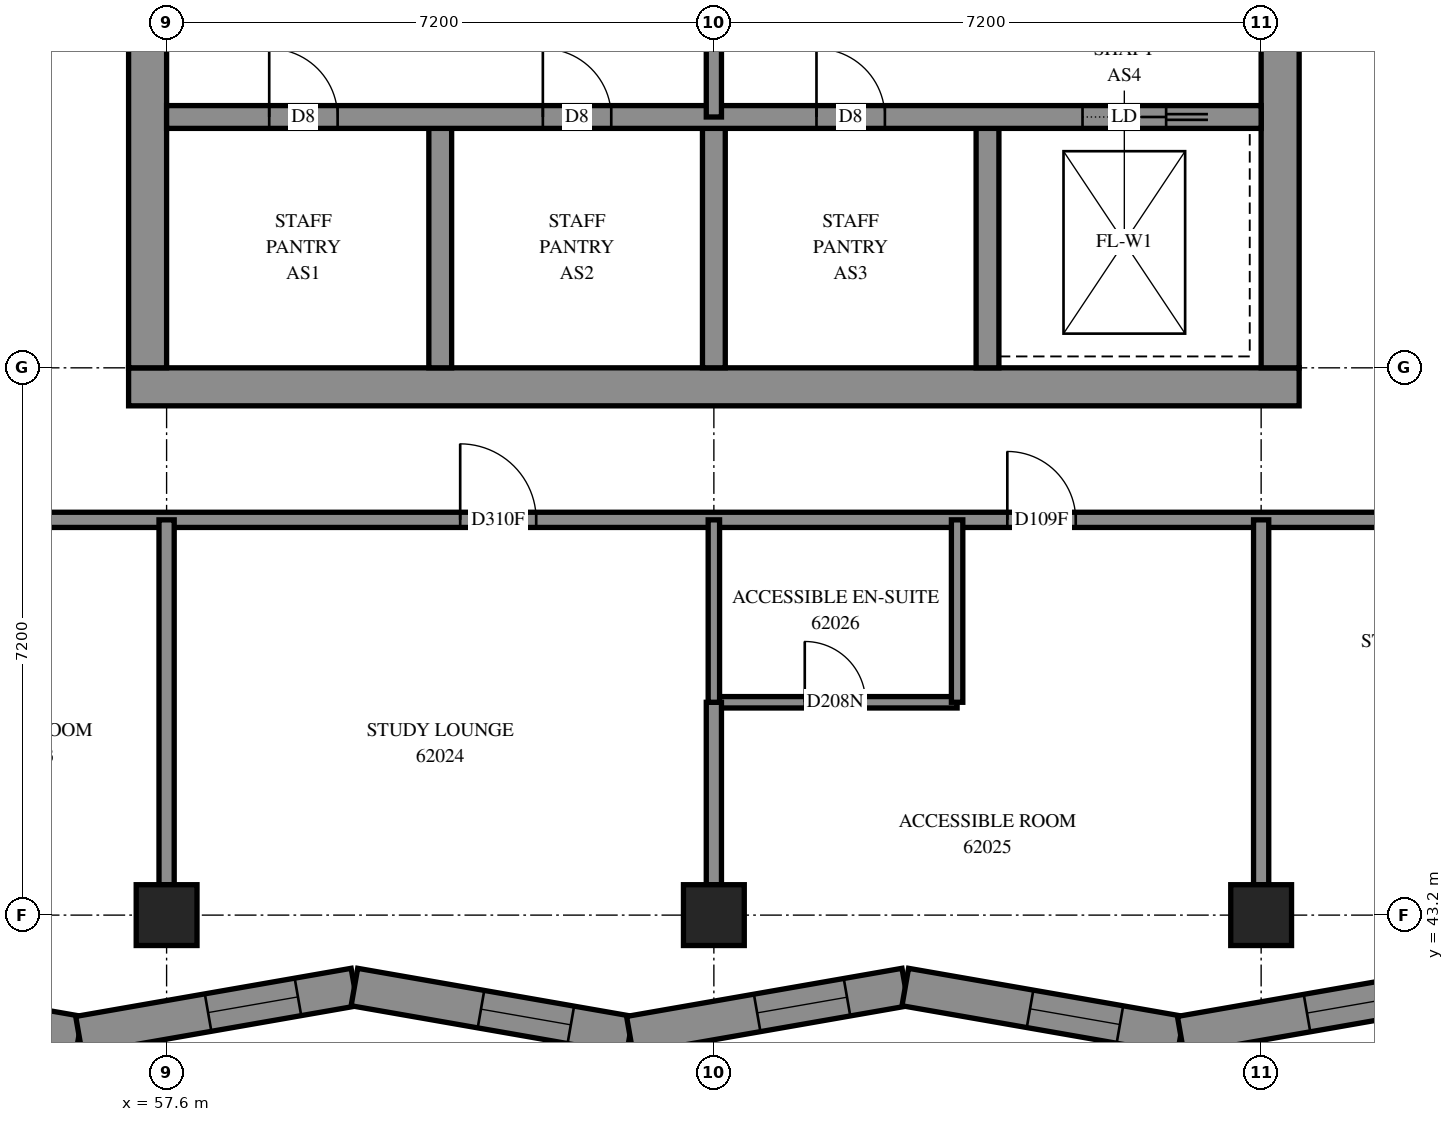
"""IFC4 building model, lengths in metres.
Left out: names, types, materials, properties, quantities, classifications, styles, units other than length and angle.
Written with IfcOpenShell. Run it as: python <this file> out.ifc"""

import sys

from ifc_helpers import new_model, si_unit, direction, frame, frame_2d, origin, origin_2d, place, context, subcontext, project, spatial, polyline, rectangle, outline, extrude, element, fill, save


model = new_model("IFC4")
c1 = context("Model", 3, precision=1e-05, world=origin(), true_north=direction((0.0, 1.0)))
c2 = subcontext(c1, "Body", "Model", "MODEL_VIEW")
j1 = project(units=[si_unit("LENGTHUNIT", "METRE"), si_unit("PLANEANGLEUNIT", "RADIAN")], contexts=[c1])
p1 = place(None, origin())
s1 = spatial("IfcSite", under=j1, at=p1, CompositionType="ELEMENT")
p2 = place(p1, origin())
s2 = spatial("IfcBuilding", under=s1, at=p2, CompositionType="ELEMENT")
p3 = place(p2, frame((0.0, 0.0, 227.0)))
s3 = spatial("IfcBuildingStorey", under=s2, at=p3, CompositionType="ELEMENT", Elevation=227.0)
for number, where, z_axis, x_axis in (
    (1, (57.6, 43.2, 0.0), (0.0, 0.0, 1.0), (1.0, 0.0, 0.0)),
    (2, (64.8, 43.2, 0.0), (0.0, 0.0, 1.0), (1.0, 0.0, 0.0)),
    (3, (72.0, 43.2, 0.0), (0.0, 0.0, 1.0), (1.0, 0.0, 0.0)),
):
    element("IfcColumn", number, at=place(p3, frame(where, z_axis=z_axis, x_axis=x_axis)), inside=s3, PredefinedType="COLUMN", context=c2, shape_type="SweptSolid", body=[
        extrude(rectangle(XDim=0.8, YDim=0.8, at=origin_2d()), origin(), (0.0, 0.0, 1.0), 3.1),
    ])
p4 = place(p3, frame((57.1, 50.15, -0.3), z_axis=(0.0, 0.0, 1.0), x_axis=(1.0, 0.0, 0.0)))
e4 = element("IfcWall", 4, at=p4, inside=s3, PredefinedType="SHEAR", context=c2, shape_type="SweptSolid", body=[
    extrude(rectangle(XDim=15.4, YDim=0.5, at=frame_2d((7.7, 0.0))), origin(), (0.0, 0.0, 1.0), 2.7),
])
p5 = place(p3, frame((57.35, 50.4, -0.3), z_axis=(0.0, 0.0, 1.0), x_axis=(0.0, 1.0, 0.0)))
e5 = element("IfcWall", 5, at=p5, inside=s3, PredefinedType="SHEAR", context=c2, shape_type="SweptSolid", body=[
    extrude(rectangle(XDim=14.4, YDim=0.5, at=frame_2d((7.2, 0.0))), origin(), (0.0, 0.0, 1.0), 2.7),
])
p6 = place(p5, frame((4.55, 0.0, 0.3)))
e6 = element("IfcOpeningElement", 6, at=p6, cuts=e5, PredefinedType="OPENING", context=c2, shape_type="SweptSolid", body=[
    extrude(rectangle(XDim=1.1, YDim=2.1, at=frame_2d((0.55, 1.05))), frame((0.0, 0.26, 0.0), z_axis=(0.0, -1.0, 0.0), x_axis=(1.0, 0.0, 0.0)), (0.0, 0.0, 1.0), 0.52),
])
p7 = place(p5, frame((11.35, 0.0, 0.3)))
e7 = element("IfcOpeningElement", 7, at=p7, cuts=e5, PredefinedType="OPENING", context=c2, shape_type="SweptSolid", body=[
    extrude(rectangle(XDim=1.1, YDim=2.1, at=frame_2d((0.55, 1.05))), frame((0.0, 0.26, 0.0), z_axis=(0.0, -1.0, 0.0), x_axis=(1.0, 0.0, 0.0)), (0.0, 0.0, 1.0), 0.52),
])
p8 = place(p3, frame((72.25, 50.4, -0.3), z_axis=(0.0, 0.0, 1.0), x_axis=(0.0, 1.0, 0.0)))
e8 = element("IfcWall", 8, at=p8, inside=s3, PredefinedType="SHEAR", context=c2, shape_type="SweptSolid", body=[
    extrude(rectangle(XDim=14.4, YDim=0.5, at=frame_2d((7.2, 0.0))), origin(), (0.0, 0.0, 1.0), 2.7),
])
p9 = place(p8, frame((4.55, 0.0, 0.3)))
e9 = element("IfcOpeningElement", 9, at=p9, cuts=e8, PredefinedType="OPENING", context=c2, shape_type="SweptSolid", body=[
    extrude(rectangle(XDim=1.1, YDim=2.1, at=frame_2d((0.55, 1.05))), frame((0.0, 0.26, 0.0), z_axis=(0.0, -1.0, 0.0), x_axis=(1.0, 0.0, 0.0)), (0.0, 0.0, 1.0), 0.52),
])
p10 = place(p8, frame((11.35, 0.0, 0.3)))
e10 = element("IfcOpeningElement", 10, at=p10, cuts=e8, PredefinedType="OPENING", context=c2, shape_type="SweptSolid", body=[
    extrude(rectangle(XDim=1.1, YDim=2.1, at=frame_2d((0.55, 1.05))), frame((0.0, 0.26, 0.0), z_axis=(0.0, -1.0, 0.0), x_axis=(1.0, 0.0, 0.0)), (0.0, 0.0, 1.0), 0.52),
])
for number, where, z_axis, x_axis in (
    (11, (61.2, 50.4, 0.0), (0.0, 0.0, 1.0), (0.0, 1.0, 0.0)),
    (12, (64.8, 50.4, 0.0), (0.0, 0.0, 1.0), (0.0, 1.0, 0.0)),
    (13, (68.4, 50.4, 0.0), (0.0, 0.0, 1.0), (0.0, 1.0, 0.0)),
):
    element("IfcWall", number, at=place(p3, frame(where, z_axis=z_axis, x_axis=x_axis)), inside=s3, PredefinedType="SOLIDWALL", context=c2, shape_type="SweptSolid", body=[
        extrude(rectangle(XDim=3.3, YDim=0.3, at=frame_2d((1.65, 0.0))), origin(), (0.0, 0.0, 1.0), 3.1),
    ])
p11 = place(p3, frame((57.6, 53.7, 0.0), z_axis=(0.0, 0.0, 1.0), x_axis=(1.0, 0.0, 0.0)))
e14 = element("IfcWall", 14, at=p11, inside=s3, PredefinedType="SOLIDWALL", context=c2, shape_type="SweptSolid", body=[
    extrude(rectangle(XDim=14.4, YDim=0.3, at=frame_2d((7.2, 0.0))), origin(), (0.0, 0.0, 1.0), 3.1),
])
p12 = place(p11, frame((1.35, 0.0, 0.0)))
e15 = element("IfcOpeningElement", 15, at=p12, cuts=e14, PredefinedType="OPENING", context=c2, shape_type="SweptSolid", body=[
    extrude(rectangle(XDim=0.9, YDim=2.1, at=frame_2d((0.45, 1.05))), frame((0.0, 0.16, 0.0), z_axis=(0.0, -1.0, 0.0), x_axis=(1.0, 0.0, 0.0)), (0.0, 0.0, 1.0), 0.32),
])
p13 = place(p11, frame((4.95, 0.0, 0.0)))
e16 = element("IfcOpeningElement", 16, at=p13, cuts=e14, PredefinedType="OPENING", context=c2, shape_type="SweptSolid", body=[
    extrude(rectangle(XDim=0.9, YDim=2.1, at=frame_2d((0.45, 1.05))), frame((0.0, 0.16, 0.0), z_axis=(0.0, -1.0, 0.0), x_axis=(1.0, 0.0, 0.0)), (0.0, 0.0, 1.0), 0.32),
])
p14 = place(p11, frame((8.55, 0.0, 0.0)))
e17 = element("IfcOpeningElement", 17, at=p14, cuts=e14, PredefinedType="OPENING", context=c2, shape_type="SweptSolid", body=[
    extrude(rectangle(XDim=0.9, YDim=2.1, at=frame_2d((0.45, 1.05))), frame((0.0, 0.16, 0.0), z_axis=(0.0, -1.0, 0.0), x_axis=(1.0, 0.0, 0.0)), (0.0, 0.0, 1.0), 0.32),
])
p15 = place(p11, frame((12.05, 0.0, 0.0)))
e18 = element("IfcOpeningElement", 18, at=p15, cuts=e14, PredefinedType="OPENING", context=c2, shape_type="SweptSolid", body=[
    extrude(rectangle(XDim=1.1, YDim=2.1, at=frame_2d((0.55, 1.05))), frame((0.0, 0.16, 0.0), z_axis=(0.0, -1.0, 0.0), x_axis=(1.0, 0.0, 0.0)), (0.0, 0.0, 1.0), 0.32),
])
p16 = place(p3, frame((52.804, 42.257, 0.0), z_axis=(0.0, 0.0, 1.0), x_axis=(0.9850822975, -0.1720838957, 0.0)))
e19 = element("IfcWall", 19, at=p16, inside=s3, PredefinedType="SOLIDWALL", context=c2, shape_type="SweptSolid", body=[
    extrude(outline(polyline([(0.064, -0.25), (3.742, -0.25), (3.655, 0.25), (-0.064, 0.25), (0.064, -0.25)])), origin(), (0.0, 0.0, 1.0), 3.1),
])
p17 = place(p16, frame((1.735, 0.0, 0.45)))
e20 = element("IfcOpeningElement", 20, at=p17, cuts=e19, PredefinedType="OPENING", context=c2, shape_type="SweptSolid", body=[
    extrude(rectangle(XDim=1.2, YDim=2.5, at=frame_2d((0.6, 1.25))), frame((0.0, 0.26, 0.0), z_axis=(0.0, -1.0, 0.0), x_axis=(1.0, 0.0, 0.0)), (0.0, 0.0, 1.0), 0.52),
])
p18 = place(p3, frame((56.447, 41.621, 0.0), z_axis=(0.0, 0.0, 1.0), x_axis=(0.9850825833, 0.1720822594, 0.0)))
e21 = element("IfcWall", 21, at=p18, inside=s3, PredefinedType="SOLIDWALL", context=c2, shape_type="SweptSolid", body=[
    extrude(outline(polyline([(-0.044, -0.25), (3.635, -0.25), (3.722, 0.25), (0.044, 0.25), (-0.044, -0.25)])), origin(), (0.0, 0.0, 1.0), 3.1),
])
p19 = place(p18, frame((1.724, 0.0, 0.45)))
e22 = element("IfcOpeningElement", 22, at=p19, cuts=e21, PredefinedType="OPENING", context=c2, shape_type="SweptSolid", body=[
    extrude(rectangle(XDim=1.2, YDim=2.5, at=frame_2d((0.6, 1.25))), frame((0.0, 0.26, 0.0), z_axis=(0.0, -1.0, 0.0), x_axis=(1.0, 0.0, 0.0)), (0.0, 0.0, 1.0), 0.52),
])
p20 = place(p3, frame((60.071, 42.254, 0.0), z_axis=(0.0, 0.0, 1.0), x_axis=(0.9850833883, -0.1720776512, 0.0)))
e23 = element("IfcWall", 23, at=p20, inside=s3, PredefinedType="SOLIDWALL", context=c2, shape_type="SweptSolid", body=[
    extrude(outline(polyline([(0.044, -0.25), (3.722, -0.25), (3.635, 0.25), (-0.044, 0.25), (0.044, -0.25)])), origin(), (0.0, 0.0, 1.0), 3.1),
])
p21 = place(p20, frame((1.69, 0.0, 0.45)))
e24 = element("IfcOpeningElement", 24, at=p21, cuts=e23, PredefinedType="OPENING", context=c2, shape_type="SweptSolid", body=[
    extrude(rectangle(XDim=1.2, YDim=2.5, at=frame_2d((0.6, 1.25))), frame((0.0, 0.26, 0.0), z_axis=(0.0, -1.0, 0.0), x_axis=(1.0, 0.0, 0.0)), (0.0, 0.0, 1.0), 0.52),
])
p22 = place(p3, frame((63.694, 41.621, 0.0), z_axis=(0.0, 0.0, 1.0), x_axis=(0.9850825833, 0.1720822594, 0.0)))
e25 = element("IfcWall", 25, at=p22, inside=s3, PredefinedType="SOLIDWALL", context=c2, shape_type="SweptSolid", body=[
    extrude(outline(polyline([(-0.044, -0.25), (3.635, -0.25), (3.722, 0.25), (0.044, 0.25), (-0.044, -0.25)])), origin(), (0.0, 0.0, 1.0), 3.1),
])
p23 = place(p22, frame((1.7, 0.0, 0.45)))
e26 = element("IfcOpeningElement", 26, at=p23, cuts=e25, PredefinedType="OPENING", context=c2, shape_type="SweptSolid", body=[
    extrude(rectangle(XDim=1.2, YDim=2.5, at=frame_2d((0.6, 1.25))), frame((0.0, 0.26, 0.0), z_axis=(0.0, -1.0, 0.0), x_axis=(1.0, 0.0, 0.0)), (0.0, 0.0, 1.0), 0.52),
])
p24 = place(p3, frame((67.318, 42.254, 0.0), z_axis=(0.0, 0.0, 1.0), x_axis=(0.9850825833, -0.1720822594, 0.0)))
e27 = element("IfcWall", 27, at=p24, inside=s3, PredefinedType="SOLIDWALL", context=c2, shape_type="SweptSolid", body=[
    extrude(outline(polyline([(0.044, -0.25), (3.722, -0.25), (3.635, 0.25), (-0.044, 0.25), (0.044, -0.25)])), origin(), (0.0, 0.0, 1.0), 3.1),
])
p25 = place(p24, frame((1.667, 0.0, 0.45)))
e28 = element("IfcOpeningElement", 28, at=p25, cuts=e27, PredefinedType="OPENING", context=c2, shape_type="SweptSolid", body=[
    extrude(rectangle(XDim=1.2, YDim=2.5, at=frame_2d((0.6, 1.25))), frame((0.0, 0.26, 0.0), z_axis=(0.0, -1.0, 0.0), x_axis=(1.0, 0.0, 0.0)), (0.0, 0.0, 1.0), 0.52),
])
p26 = place(p3, frame((70.942, 41.621, 0.0), z_axis=(0.0, 0.0, 1.0), x_axis=(0.9850822975, 0.1720838957, 0.0)))
e29 = element("IfcWall", 29, at=p26, inside=s3, PredefinedType="SOLIDWALL", context=c2, shape_type="SweptSolid", body=[
    extrude(outline(polyline([(-0.044, -0.25), (3.635, -0.25), (3.763, 0.25), (0.044, 0.25), (-0.044, -0.25)])), origin(), (0.0, 0.0, 1.0), 3.1),
])
p27 = place(p26, frame((1.687, 0.0, 0.45)))
e30 = element("IfcOpeningElement", 30, at=p27, cuts=e29, PredefinedType="OPENING", context=c2, shape_type="SweptSolid", body=[
    extrude(rectangle(XDim=1.2, YDim=2.5, at=frame_2d((0.6, 1.25))), frame((0.0, 0.26, 0.0), z_axis=(0.0, -1.0, 0.0), x_axis=(1.0, 0.0, 0.0)), (0.0, 0.0, 1.0), 0.52),
])
p28 = place(p3, frame((64.8, 53.7, 0.0), z_axis=(0.0, 0.0, 1.0), x_axis=(0.0, 1.0, 0.0)))
e31 = element("IfcWall", 31, at=p28, inside=s3, PredefinedType="PARTITIONING", context=c2, shape_type="SweptSolid", body=[
    extrude(rectangle(XDim=3.6, YDim=0.2, at=frame_2d((1.8, 0.0))), origin(), (0.0, 0.0, 1.0), 3.1),
])
p29 = place(p3, frame((55.6, 48.4, 0.0), z_axis=(0.0, 0.0, 1.0), x_axis=(1.0, 0.0, 0.0)))
e32 = element("IfcWall", 32, at=p29, inside=s3, PredefinedType="PARTITIONING", context=c2, shape_type="SweptSolid", body=[
    extrude(rectangle(XDim=18.4, YDim=0.2, at=frame_2d((9.2, 0.0))), origin(), (0.0, 0.0, 1.0), 3.1),
])
p30 = place(p29, frame((5.862, 0.0, 0.0)))
e33 = element("IfcOpeningElement", 33, at=p30, cuts=e32, PredefinedType="OPENING", context=c2, shape_type="SweptSolid", body=[
    extrude(rectangle(XDim=1.0, YDim=2.1, at=frame_2d((0.5, 1.05))), frame((0.0, 0.11, 0.0), z_axis=(0.0, -1.0, 0.0), x_axis=(1.0, 0.0, 0.0)), (0.0, 0.0, 1.0), 0.22),
])
p31 = place(p29, frame((13.061, 0.0, 0.0)))
e34 = element("IfcOpeningElement", 34, at=p31, cuts=e32, PredefinedType="OPENING", context=c2, shape_type="SweptSolid", body=[
    extrude(rectangle(XDim=0.9, YDim=2.1, at=frame_2d((0.45, 1.05))), frame((0.0, 0.11, 0.0), z_axis=(0.0, -1.0, 0.0), x_axis=(1.0, 0.0, 0.0)), (0.0, 0.0, 1.0), 0.22),
])
for number, where, z_axis, x_axis in (
    (35, (57.6, 43.6, 0.0), (0.0, 0.0, 1.0), (0.0, 1.0, 0.0)),
    (36, (72.0, 43.6, 0.0), (0.0, 0.0, 1.0), (0.0, 1.0, 0.0)),
):
    element("IfcWall", number, at=place(p3, frame(where, z_axis=z_axis, x_axis=x_axis)), inside=s3, PredefinedType="PARTITIONING", context=c2, shape_type="SweptSolid", body=[
        extrude(rectangle(XDim=4.8, YDim=0.2, at=frame_2d((2.4, 0.0))), origin(), (0.0, 0.0, 1.0), 3.1),
    ])
p32 = place(p3, frame((64.8, 46.0, 0.0), z_axis=(0.0, 0.0, 1.0), x_axis=(1.0, 0.0, 0.0)))
e37 = element("IfcWall", 37, at=p32, inside=s3, PredefinedType="PARTITIONING", context=c2, shape_type="SweptSolid", body=[
    extrude(rectangle(XDim=3.2, YDim=0.15, at=frame_2d((1.6, 0.0))), origin(), (0.0, 0.0, 1.0), 3.1),
])
p33 = place(p32, frame((1.196, 0.0, 0.0)))
e38 = element("IfcOpeningElement", 38, at=p33, cuts=e37, PredefinedType="OPENING", context=c2, shape_type="SweptSolid", body=[
    extrude(rectangle(XDim=0.8, YDim=2.1, at=frame_2d((0.4, 1.05))), frame((0.0, 0.085, 0.0), z_axis=(0.0, -1.0, 0.0), x_axis=(1.0, 0.0, 0.0)), (0.0, 0.0, 1.0), 0.17),
])
p34 = place(p3, frame((64.8, 43.6, 0.0), z_axis=(0.0, 0.0, 1.0), x_axis=(0.0, 1.0, 0.0)))
e39 = element("IfcWall", 39, at=p34, inside=s3, PredefinedType="PARTITIONING", context=c2, shape_type="SweptSolid", body=[
    extrude(rectangle(XDim=2.4, YDim=0.2, at=frame_2d((1.2, 0.0))), origin(), (0.0, 0.0, 1.0), 3.1),
])
for number, where, z_axis, x_axis in (
    (40, (68.0, 46.0, 0.0), (0.0, 0.0, 1.0), (0.0, 1.0, 0.0)),
    (41, (64.8, 46.0, 0.0), (0.0, 0.0, 1.0), (0.0, 1.0, 0.0)),
):
    element("IfcWall", number, at=place(p3, frame(where, z_axis=z_axis, x_axis=x_axis)), inside=s3, PredefinedType="PARTITIONING", context=c2, shape_type="SweptSolid", body=[
        extrude(rectangle(XDim=2.4, YDim=0.15, at=frame_2d((1.2, 0.0))), origin(), (0.0, 0.0, 1.0), 3.1),
    ])
p35 = place(p19, origin())
e42 = element("IfcWindow", 42, at=p35, inside=s3, PartitioningType="SINGLE_PANEL", PredefinedType="WINDOW", context=c2, shape_type="SweptSolid", body=[
    extrude(rectangle(XDim=1.2, YDim=2.5, at=frame_2d((0.6, 1.25))), frame((0.0, 0.18, 0.0), z_axis=(0.0, -1.0, 0.0), x_axis=(1.0, 0.0, 0.0)), (0.0, 0.0, 1.0), 0.06),
])
fill(e22, e42)
p36 = place(p21, origin())
e43 = element("IfcWindow", 43, at=p36, inside=s3, PartitioningType="SINGLE_PANEL", PredefinedType="WINDOW", context=c2, shape_type="SweptSolid", body=[
    extrude(rectangle(XDim=1.2, YDim=2.5, at=frame_2d((0.6, 1.25))), frame((0.0, 0.18, 0.0), z_axis=(0.0, -1.0, 0.0), x_axis=(1.0, 0.0, 0.0)), (0.0, 0.0, 1.0), 0.06),
])
fill(e24, e43)
p37 = place(p23, origin())
e44 = element("IfcWindow", 44, at=p37, inside=s3, PartitioningType="SINGLE_PANEL", PredefinedType="WINDOW", context=c2, shape_type="SweptSolid", body=[
    extrude(rectangle(XDim=1.2, YDim=2.5, at=frame_2d((0.6, 1.25))), frame((0.0, 0.18, 0.0), z_axis=(0.0, -1.0, 0.0), x_axis=(1.0, 0.0, 0.0)), (0.0, 0.0, 1.0), 0.06),
])
fill(e26, e44)
p38 = place(p25, origin())
e45 = element("IfcWindow", 45, at=p38, inside=s3, PartitioningType="SINGLE_PANEL", PredefinedType="WINDOW", context=c2, shape_type="SweptSolid", body=[
    extrude(rectangle(XDim=1.2, YDim=2.5, at=frame_2d((0.6, 1.25))), frame((0.0, 0.18, 0.0), z_axis=(0.0, -1.0, 0.0), x_axis=(1.0, 0.0, 0.0)), (0.0, 0.0, 1.0), 0.06),
])
fill(e28, e45)
p39 = place(p27, origin())
e46 = element("IfcWindow", 46, at=p39, inside=s3, PartitioningType="SINGLE_PANEL", PredefinedType="WINDOW", context=c2, shape_type="SweptSolid", body=[
    extrude(rectangle(XDim=1.2, YDim=2.5, at=frame_2d((0.6, 1.25))), frame((0.0, 0.18, 0.0), z_axis=(0.0, -1.0, 0.0), x_axis=(1.0, 0.0, 0.0)), (0.0, 0.0, 1.0), 0.06),
])
fill(e30, e46)
p40 = place(p12, origin())
e47 = element("IfcDoor", 47, at=p40, inside=s3, OperationType="SINGLE_SWING_LEFT", PredefinedType="DOOR", context=c2, shape_type="SweptSolid", body=[
    extrude(rectangle(XDim=0.9, YDim=2.1, at=frame_2d((0.45, 1.05))), frame((0.0, 0.025, 0.0), z_axis=(0.0, -1.0, 0.0), x_axis=(1.0, 0.0, 0.0)), (0.0, 0.0, 1.0), 0.05),
])
fill(e15, e47)
p41 = place(p13, origin())
e48 = element("IfcDoor", 48, at=p41, inside=s3, OperationType="SINGLE_SWING_LEFT", PredefinedType="DOOR", context=c2, shape_type="SweptSolid", body=[
    extrude(rectangle(XDim=0.9, YDim=2.1, at=frame_2d((0.45, 1.05))), frame((0.0, 0.025, 0.0), z_axis=(0.0, -1.0, 0.0), x_axis=(1.0, 0.0, 0.0)), (0.0, 0.0, 1.0), 0.05),
])
fill(e16, e48)
p42 = place(p14, origin())
e49 = element("IfcDoor", 49, at=p42, inside=s3, OperationType="SINGLE_SWING_LEFT", PredefinedType="DOOR", context=c2, shape_type="SweptSolid", body=[
    extrude(rectangle(XDim=0.9, YDim=2.1, at=frame_2d((0.45, 1.05))), frame((0.0, 0.025, 0.0), z_axis=(0.0, -1.0, 0.0), x_axis=(1.0, 0.0, 0.0)), (0.0, 0.0, 1.0), 0.05),
])
fill(e17, e49)
p43 = place(p15, origin())
e50 = element("IfcDoor", 50, at=p43, inside=s3, OperationType="SLIDING_TO_RIGHT", PredefinedType="DOOR", context=c2, shape_type="SweptSolid", body=[
    extrude(rectangle(XDim=1.1, YDim=2.1, at=frame_2d((0.55, 1.05))), frame((0.0, 0.025, 0.0), z_axis=(0.0, -1.0, 0.0), x_axis=(1.0, 0.0, 0.0)), (0.0, 0.0, 1.0), 0.05),
])
fill(e18, e50)
p44 = place(p30, origin())
e51 = element("IfcDoor", 51, at=p44, inside=s3, OperationType="SINGLE_SWING_LEFT", PredefinedType="DOOR", context=c2, shape_type="SweptSolid", body=[
    extrude(rectangle(XDim=1.0, YDim=2.1, at=frame_2d((0.5, 1.05))), frame((0.0, 0.025, 0.0), z_axis=(0.0, -1.0, 0.0), x_axis=(1.0, 0.0, 0.0)), (0.0, 0.0, 1.0), 0.05),
])
fill(e33, e51)
p45 = place(p31, origin())
e52 = element("IfcDoor", 52, at=p45, inside=s3, OperationType="SINGLE_SWING_LEFT", PredefinedType="DOOR", context=c2, shape_type="SweptSolid", body=[
    extrude(rectangle(XDim=0.9, YDim=2.1, at=frame_2d((0.45, 1.05))), frame((0.0, 0.025, 0.0), z_axis=(0.0, -1.0, 0.0), x_axis=(1.0, 0.0, 0.0)), (0.0, 0.0, 1.0), 0.05),
])
fill(e34, e52)
p46 = place(p33, origin())
e53 = element("IfcDoor", 53, at=p46, inside=s3, OperationType="SINGLE_SWING_RIGHT", PredefinedType="DOOR", context=c2, shape_type="SweptSolid", body=[
    extrude(rectangle(XDim=0.8, YDim=2.1, at=frame_2d((0.4, 1.05))), frame((0.0, 0.025, 0.0), z_axis=(0.0, -1.0, 0.0), x_axis=(1.0, 0.0, 0.0)), (0.0, 0.0, 1.0), 0.05),
])
fill(e38, e53)
save(model, sys.argv[1])
